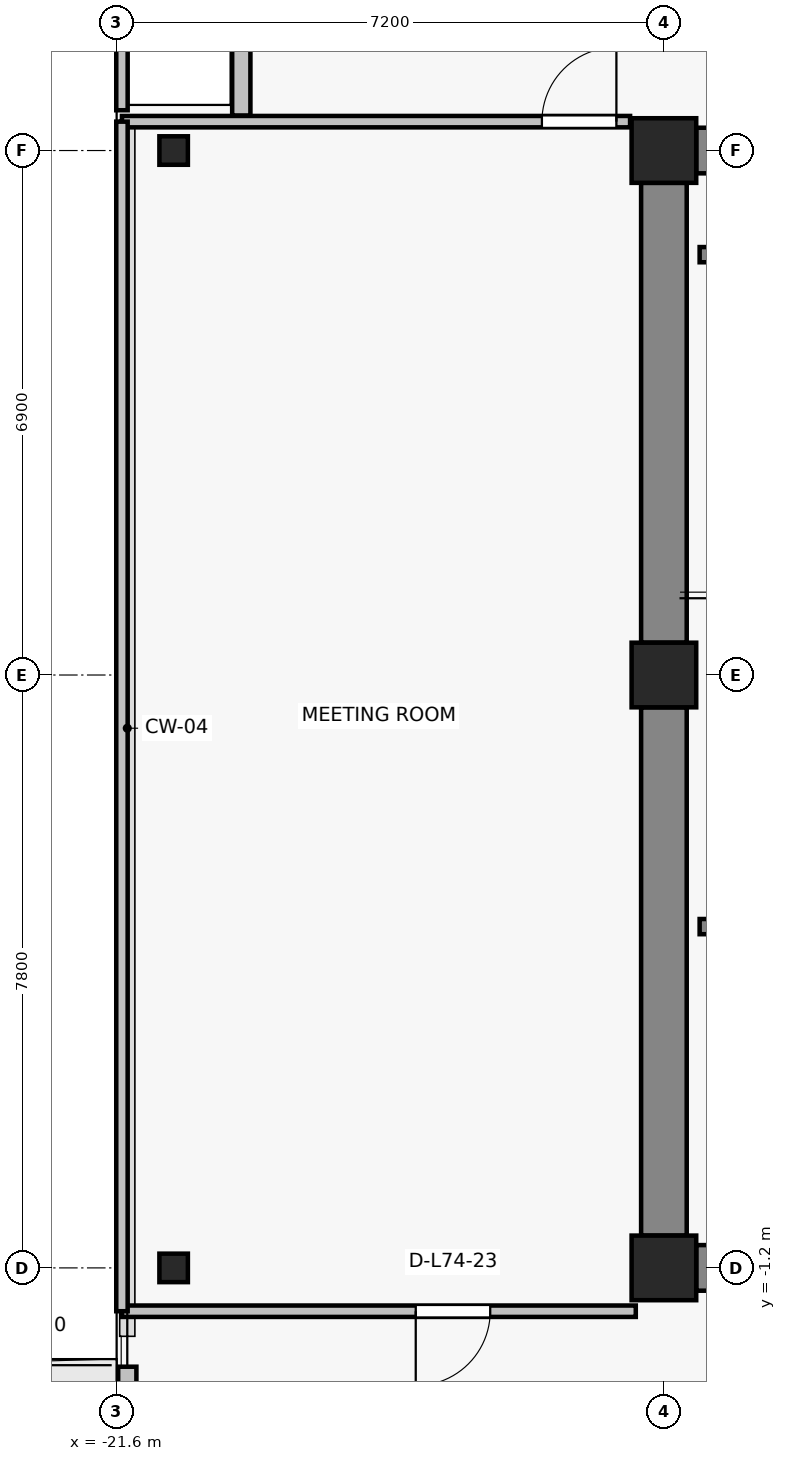
"""IFC4 building model, lengths in metres.
Left out: names, types, materials, properties, quantities, classifications, styles, units other than length and angle.
Written with IfcOpenShell. Run it as: python <this file> out.ifc"""

import sys

from ifc_helpers import new_model, si_unit, direction, frame, frame_2d, origin, origin_2d, place, context, subcontext, project, spatial, rectangle, i_section, extrude, source, transform, mapped, element, fill, save


model = new_model("IFC4")
c1 = context("Model", 3, precision=1e-05, world=origin(), true_north=direction((0.0, 1.0)))
c2 = subcontext(c1, "Body", "Model", "MODEL_VIEW")
j1 = project(units=[si_unit("LENGTHUNIT", "METRE"), si_unit("PLANEANGLEUNIT", "RADIAN")], contexts=[c1])
p1 = place(None, origin())
s1 = spatial("IfcSite", under=j1, at=p1, CompositionType="ELEMENT")
p2 = place(p1, origin())
s2 = spatial("IfcBuilding", under=s1, at=p2, CompositionType="ELEMENT")
p3 = place(p2, frame((0.0, 0.0, 261.7)))
s3 = spatial("IfcBuildingStorey", under=s2, at=p3, CompositionType="ELEMENT", Elevation=261.7)
for number, where, z_axis, x_axis in (
    (1, (-14.4, -1.2, 0.0), (0.0, 0.0, 1.0), (1.0, 0.0, 0.0)),
    (2, (-14.4, 6.6, 0.0), (0.0, 0.0, 1.0), (1.0, 0.0, 0.0)),
    (3, (-14.4, 13.5, 0.0), (0.0, 0.0, 1.0), (1.0, 0.0, 0.0)),
):
    element("IfcColumn", number, at=place(p3, frame(where, z_axis=z_axis, x_axis=x_axis)), inside=s3, PredefinedType="COLUMN", context=c2, shape_type="SweptSolid", body=[
        extrude(rectangle(XDim=0.85, YDim=0.85, at=origin_2d()), origin(), (0.0, 0.0, 1.0), 3.3),
    ])
for number, where, z_axis, x_axis in (
    (4, (-20.85, -1.2, 0.0), (0.0, 0.0, 1.0), (1.0, 0.0, 0.0)),
    (5, (-20.85, 13.5, 0.0), (0.0, 0.0, 1.0), (1.0, 0.0, 0.0)),
):
    element("IfcColumn", number, at=place(p3, frame(where, z_axis=z_axis, x_axis=x_axis)), inside=s3, PredefinedType="COLUMN", context=c2, shape_type="SweptSolid", body=[
        extrude(i_section(OverallWidth=0.375, OverallDepth=0.375, WebThickness=0.017, FlangeThickness=0.027, FilletRadius=0.015, at=origin_2d()), origin(), (0.0, 0.0, 1.0), 3.3),
    ])
p4 = place(p3, frame((-13.975, 13.5, 0.0), z_axis=(0.0, 0.0, 1.0), x_axis=(1.0, 0.0, 0.0)))
e6 = element("IfcWall", 6, at=p4, inside=s3, PredefinedType="SHEAR", context=c2, shape_type="SweptSolid", body=[
    extrude(rectangle(XDim=6.35, YDim=0.6, at=frame_2d((3.175, 0.0))), origin(), (0.0, 0.0, 1.0), 3.075),
])
p5 = place(p3, frame((-14.4, -0.775, 0.0), z_axis=(0.0, 0.0, 1.0), x_axis=(0.0, 1.0, 0.0)))
e7 = element("IfcWall", 7, at=p5, inside=s3, PredefinedType="SHEAR", context=c2, shape_type="SweptSolid", body=[
    extrude(rectangle(XDim=6.95, YDim=0.6, at=frame_2d((3.475, 0.0))), origin(), (0.0, 0.0, 1.0), 3.075),
])
p6 = place(p3, frame((-14.4, 7.025, 0.0), z_axis=(0.0, 0.0, 1.0), x_axis=(0.0, 1.0, 0.0)))
e8 = element("IfcWall", 8, at=p6, inside=s3, PredefinedType="SHEAR", context=c2, shape_type="SweptSolid", body=[
    extrude(rectangle(XDim=6.05, YDim=0.6, at=frame_2d((3.025, 0.0))), origin(), (0.0, 0.0, 1.0), 3.075),
])
p7 = place(p3, frame((-7.625, -1.2, 0.0), z_axis=(0.0, 0.0, 1.0), x_axis=(-1.0, 0.0, 0.0)))
e9 = element("IfcWall", 9, at=p7, inside=s3, PredefinedType="SHEAR", context=c2, shape_type="SweptSolid", body=[
    extrude(rectangle(XDim=6.35, YDim=0.6, at=frame_2d((3.175, 0.0))), origin(), (0.0, 0.0, 1.0), 3.075),
])
p8 = place(p7, frame((2.7, 0.0, 0.0)))
e10 = element("IfcOpeningElement", 10, at=p8, cuts=e9, PredefinedType="OPENING", context=c2, shape_type="SweptSolid", body=[
    extrude(rectangle(XDim=1.15, YDim=2.15, at=frame_2d((0.575, 1.075))), frame((0.0, 0.31, 0.0), z_axis=(0.0, -1.0, 0.0), x_axis=(1.0, 0.0, 0.0)), (0.0, 0.0, 1.0), 0.62),
])
p9 = place(p3, frame((-21.46, -8.3, 0.0), z_axis=(0.0, 0.0, 1.0), x_axis=(0.0, 1.0, 0.0)))
e11 = element("IfcWall", 11, at=p9, inside=s3, PredefinedType="SOLIDWALL", context=c2, shape_type="SweptSolid", body=[
    extrude(rectangle(XDim=5.8, YDim=0.24, at=frame_2d((2.9, 0.0))), origin(), (0.0, 0.0, 1.0), 3.075),
])
p10 = place(p9, frame((0.696, 0.0, 0.0)))
e12 = element("IfcOpeningElement", 12, at=p10, cuts=e11, PredefinedType="OPENING", context=c2, shape_type="SweptSolid", body=[
    extrude(rectangle(XDim=1.0, YDim=2.2, at=frame_2d((0.5, 1.1))), frame((0.0, 0.13, 0.0), z_axis=(0.0, -1.0, 0.0), x_axis=(1.0, 0.0, 0.0)), (0.0, 0.0, 1.0), 0.26),
])
p11 = place(p9, frame((2.046, 0.0, 0.85)))
e13 = element("IfcOpeningElement", 13, at=p11, cuts=e11, PredefinedType="OPENING", context=c2, shape_type="SweptSolid", body=[
    extrude(rectangle(XDim=1.5, YDim=1.6, at=frame_2d((0.75, 0.8))), frame((0.0, 0.13, 0.0), z_axis=(0.0, -1.0, 0.0), x_axis=(1.0, 0.0, 0.0)), (0.0, 0.0, 1.0), 0.26),
])
p12 = place(p3, frame((-19.96, 15.46, 0.0), z_axis=(0.0, 0.0, 1.0), x_axis=(0.0, -1.0, 0.0)))
e14 = element("IfcWall", 14, at=p12, inside=s3, PredefinedType="SOLIDWALL", context=c2, shape_type="SweptSolid", body=[
    extrude(rectangle(XDim=1.5, YDim=0.24, at=frame_2d((0.75, 0.0))), origin(), (0.0, 0.0, 1.0), 3.075),
])
p13 = place(p3, frame((-10.41, 3.29, 0.0), z_axis=(0.0, 0.0, 1.0), x_axis=(-1.0, 0.0, 0.0)))
e15 = element("IfcWall", 15, at=p13, inside=s3, PredefinedType="SOLIDWALL", context=c2, shape_type="SweptSolid", body=[
    extrude(rectangle(XDim=3.52, YDim=0.2, at=frame_2d((1.76, 0.0))), origin(), (0.0, 0.0, 1.0), 3.075),
])
p14 = place(p13, frame((1.165, 0.0, 0.0)))
e16 = element("IfcOpeningElement", 16, at=p14, cuts=e15, PredefinedType="OPENING", context=c2, shape_type="SweptSolid", body=[
    extrude(rectangle(XDim=1.15, YDim=2.15, at=frame_2d((0.575, 1.075))), frame((0.0, 0.11, 0.0), z_axis=(0.0, -1.0, 0.0), x_axis=(1.0, 0.0, 0.0)), (0.0, 0.0, 1.0), 0.22),
])
p15 = place(p3, frame((-13.93, 12.13, 0.0), z_axis=(0.0, 0.0, 1.0), x_axis=(1.0, 0.0, 0.0)))
e17 = element("IfcWall", 17, at=p15, inside=s3, PredefinedType="SOLIDWALL", context=c2, shape_type="SweptSolid", body=[
    extrude(rectangle(XDim=3.52, YDim=0.2, at=frame_2d((1.76, 0.0))), origin(), (0.0, 0.0, 1.0), 3.075),
])
p16 = place(p3, frame((-14.77, -1.77, 0.0), z_axis=(0.0, 0.0, 1.0), x_axis=(-1.0, 0.0, 0.0)))
e18 = element("IfcWall", 18, at=p16, inside=s3, PredefinedType="PARTITIONING", context=c2, shape_type="SweptSolid", body=[
    extrude(rectangle(XDim=6.76, YDim=0.15, at=frame_2d((3.38, 0.0))), origin(), (0.0, 0.0, 1.0), 2.765),
])
p17 = place(p16, frame((1.915, 0.0, 0.0)))
e19 = element("IfcOpeningElement", 19, at=p17, cuts=e18, PredefinedType="OPENING", context=c2, shape_type="SweptSolid", body=[
    extrude(rectangle(XDim=0.98, YDim=2.15, at=frame_2d((0.49, 1.075))), frame((0.0, 0.085, 0.0), z_axis=(0.0, -1.0, 0.0), x_axis=(1.0, 0.0, 0.0)), (0.0, 0.0, 1.0), 0.17),
])
p18 = place(p3, frame((-21.53, 13.88, 0.0), z_axis=(0.0, 0.0, 1.0), x_axis=(1.0, 0.0, 0.0)))
e20 = element("IfcWall", 20, at=p18, inside=s3, PredefinedType="PARTITIONING", context=c2, shape_type="SweptSolid", body=[
    extrude(rectangle(XDim=6.685, YDim=0.15, at=frame_2d((3.343, 0.0))), origin(), (0.0, 0.0, 1.0), 3.075),
])
p19 = place(p18, frame((5.525, 0.0, 0.0)))
e21 = element("IfcOpeningElement", 21, at=p19, cuts=e20, PredefinedType="OPENING", context=c2, shape_type="SweptSolid", body=[
    extrude(rectangle(XDim=0.98, YDim=2.15, at=frame_2d((0.49, 1.075))), frame((0.0, 0.085, 0.0), z_axis=(0.0, -1.0, 0.0), x_axis=(1.0, 0.0, 0.0)), (0.0, 0.0, 1.0), 0.17),
])
p20 = place(p3, frame((-21.53, -1.77, 0.0), z_axis=(0.0, 0.0, 1.0), x_axis=(0.0, 1.0, 0.0)))
e22 = element("IfcWall", 22, at=p20, inside=s3, PredefinedType="PARTITIONING", context=c2, shape_type="SweptSolid", body=[
    extrude(rectangle(XDim=15.65, YDim=0.15, at=frame_2d((7.825, 0.0))), origin(), (0.0, 0.0, 1.0), 3.075),
])
p21 = place(p3, frame((-21.53, 14.03, 0.0), z_axis=(0.0, 0.0, 1.0), x_axis=(0.0, 1.0, 0.0)))
e23 = element("IfcWall", 23, at=p21, inside=s3, PredefinedType="PARTITIONING", context=c2, shape_type="SweptSolid", body=[
    extrude(rectangle(XDim=3.0, YDim=0.15, at=frame_2d((1.5, 0.0))), origin(), (0.0, 0.0, 1.0), 3.075),
])
m1 = source(origin(), c2, "Body", "SweptSolid", [
    extrude(rectangle(XDim=0.98, YDim=2.15, at=frame_2d((0.49, 1.075))), frame((0.0, 0.025, 0.0), z_axis=(0.0, -1.0, 0.0), x_axis=(1.0, 0.0, 0.0)), (0.0, 0.0, 1.0), 0.05),
])
p22 = place(p17, origin())
e24 = element("IfcDoor", 24, at=p22, inside=s3, OperationType="SINGLE_SWING_RIGHT", PredefinedType="DOOR", context=c2, shape_type="MappedRepresentation", body=[
    mapped(m1, transform((0.0, 0.0, 0.0), x_axis=(1.0, 0.0, 0.0), y_axis=(0.0, 1.0, 0.0), z_axis=(0.0, 0.0, 1.0), scale=1.0)),
])
fill(e19, e24)
p23 = place(p19, origin())
e25 = element("IfcDoor", 25, at=p23, inside=s3, OperationType="SINGLE_SWING_RIGHT", PredefinedType="DOOR", context=c2, shape_type="MappedRepresentation", body=[
    mapped(m1, transform((0.0, 0.0, 0.0), x_axis=(1.0, 0.0, 0.0), y_axis=(0.0, 1.0, 0.0), z_axis=(0.0, 0.0, 1.0), scale=1.0)),
])
fill(e21, e25)
save(model, sys.argv[1])
